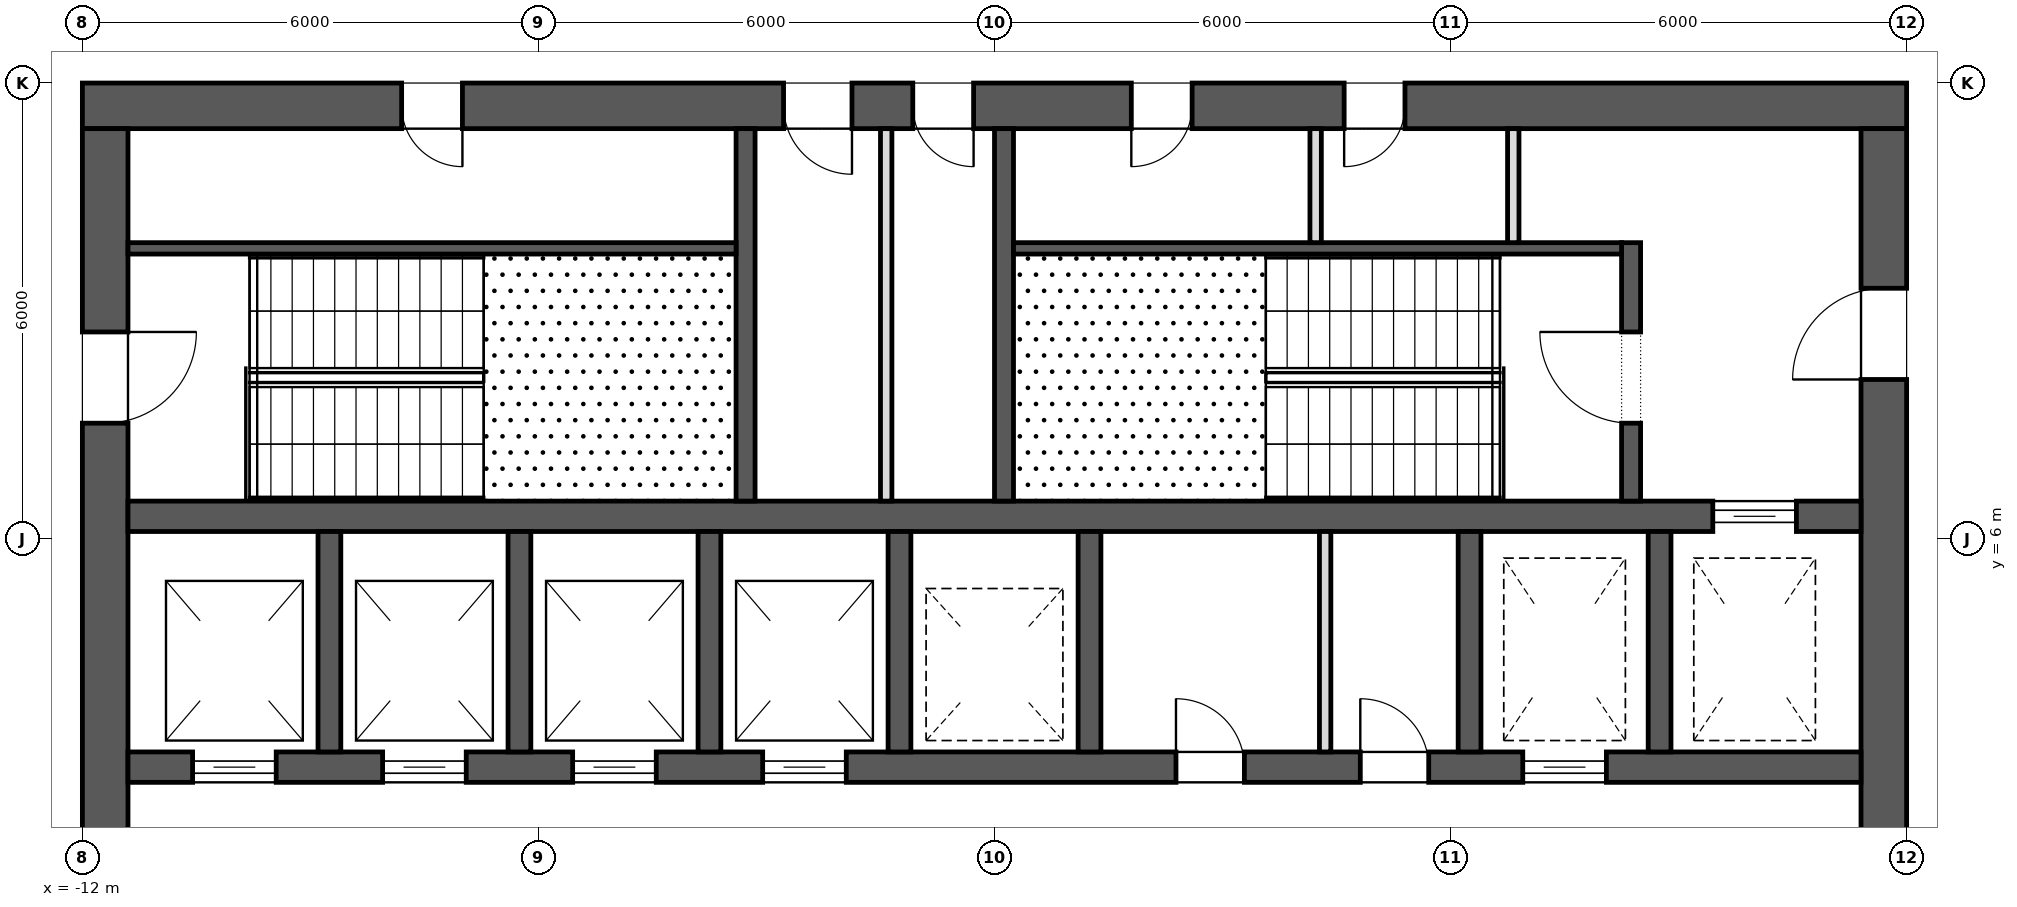
"""IFC4 building model, lengths in metres.
Left out: names, types, materials, properties, quantities, classifications, styles, units other than length and angle.
Written with IfcOpenShell. Run it as: python <this file> out.ifc"""

import sys

from ifc_helpers import new_model, si_unit, direction, frame, frame_2d, origin, place, context, subcontext, project, spatial, rectangle, extrude, element, fill, save


model = new_model("IFC4")
c1 = context("Model", 3, precision=1e-05, world=origin(), true_north=direction((0.0, 1.0)))
c2 = subcontext(c1, "Body", "Model", "MODEL_VIEW")
j1 = project(units=[si_unit("LENGTHUNIT", "METRE"), si_unit("PLANEANGLEUNIT", "RADIAN")], contexts=[c1])
p1 = place(None, origin())
s1 = spatial("IfcSite", under=j1, at=p1, CompositionType="ELEMENT")
p2 = place(p1, origin())
s2 = spatial("IfcBuilding", under=s1, at=p2, CompositionType="ELEMENT")
p3 = place(p2, frame((0.0, 0.0, 186.9)))
s3 = spatial("IfcBuildingStorey", under=s2, at=p3, CompositionType="ELEMENT", Elevation=186.9)
p4 = place(p3, frame((-12.0, 11.7, 0.0), z_axis=(0.0, 0.0, 1.0), x_axis=(1.0, 0.0, 0.0)))
e1 = element("IfcWall", 1, at=p4, inside=s3, PredefinedType="SHEAR", context=c2, shape_type="SweptSolid", body=[
    extrude(rectangle(XDim=24.0, YDim=0.6, at=frame_2d((12.0, 0.0))), origin(), (0.0, 0.0, 1.0), 4.0),
])
p5 = place(p4, frame((9.225, 0.0, 0.0)))
e2 = element("IfcOpeningElement", 2, at=p5, cuts=e1, PredefinedType="OPENING", context=c2, shape_type="SweptSolid", body=[
    extrude(rectangle(XDim=0.9, YDim=2.1, at=frame_2d((0.45, 1.05))), frame((0.0, 0.312, 0.0), z_axis=(0.0, -1.0, 0.0), x_axis=(1.0, 0.0, 0.0)), (0.0, 0.0, 1.0), 0.624),
])
p6 = place(p4, frame((10.925, 0.0, 0.0)))
e3 = element("IfcOpeningElement", 3, at=p6, cuts=e1, PredefinedType="OPENING", context=c2, shape_type="SweptSolid", body=[
    extrude(rectangle(XDim=0.8, YDim=2.1, at=frame_2d((0.4, 1.05))), frame((0.0, 0.312, 0.0), z_axis=(0.0, -1.0, 0.0), x_axis=(1.0, 0.0, 0.0)), (0.0, 0.0, 1.0), 0.624),
])
p7 = place(p4, frame((4.2, 0.0, 0.0)))
e4 = element("IfcOpeningElement", 4, at=p7, cuts=e1, PredefinedType="OPENING", context=c2, shape_type="SweptSolid", body=[
    extrude(rectangle(XDim=0.8, YDim=2.1, at=frame_2d((0.4, 1.05))), frame((0.0, 0.312, 0.0), z_axis=(0.0, -1.0, 0.0), x_axis=(1.0, 0.0, 0.0)), (0.0, 0.0, 1.0), 0.624),
])
p8 = place(p4, frame((13.8, 0.0, 0.0)))
e5 = element("IfcOpeningElement", 5, at=p8, cuts=e1, PredefinedType="OPENING", context=c2, shape_type="SweptSolid", body=[
    extrude(rectangle(XDim=0.8, YDim=2.1, at=frame_2d((0.4, 1.05))), frame((0.0, 0.312, 0.0), z_axis=(0.0, -1.0, 0.0), x_axis=(1.0, 0.0, 0.0)), (0.0, 0.0, 1.0), 0.624),
])
p9 = place(p4, frame((16.6, 0.0, 0.0)))
e6 = element("IfcOpeningElement", 6, at=p9, cuts=e1, PredefinedType="OPENING", context=c2, shape_type="SweptSolid", body=[
    extrude(rectangle(XDim=0.8, YDim=2.1, at=frame_2d((0.4, 1.05))), frame((0.0, 0.312, 0.0), z_axis=(0.0, -1.0, 0.0), x_axis=(1.0, 0.0, 0.0)), (0.0, 0.0, 1.0), 0.624),
])
p10 = place(p3, frame((11.7, -11.4, 0.0), z_axis=(0.0, 0.0, 1.0), x_axis=(0.0, 1.0, 0.0)))
e7 = element("IfcWall", 7, at=p10, inside=s3, PredefinedType="SHEAR", context=c2, shape_type="SweptSolid", body=[
    extrude(rectangle(XDim=22.8, YDim=0.6, at=frame_2d((11.4, 0.0))), origin(), (0.0, 0.0, 1.0), 4.0),
])
p11 = place(p10, frame((10.2, 0.0, 0.0)))
e8 = element("IfcOpeningElement", 8, at=p11, cuts=e7, PredefinedType="OPENING", context=c2, shape_type="SweptSolid", body=[
    extrude(rectangle(XDim=2.4, YDim=2.1, at=frame_2d((1.2, 1.05))), frame((0.0, 0.312, 0.0), z_axis=(0.0, -1.0, 0.0), x_axis=(1.0, 0.0, 0.0)), (0.0, 0.0, 1.0), 0.624),
])
p12 = place(p10, frame((19.5, 0.0, 0.0)))
e9 = element("IfcOpeningElement", 9, at=p12, cuts=e7, PredefinedType="OPENING", context=c2, shape_type="SweptSolid", body=[
    extrude(rectangle(XDim=1.2, YDim=2.1, at=frame_2d((0.6, 1.05))), frame((0.0, 0.312, 0.0), z_axis=(0.0, -1.0, 0.0), x_axis=(1.0, 0.0, 0.0)), (0.0, 0.0, 1.0), 0.624),
])
p13 = place(p10, frame((2.1, 0.0, 0.0)))
e10 = element("IfcOpeningElement", 10, at=p13, cuts=e7, PredefinedType="OPENING", context=c2, shape_type="SweptSolid", body=[
    extrude(rectangle(XDim=1.2, YDim=2.1, at=frame_2d((0.6, 1.05))), frame((0.0, 0.312, 0.0), z_axis=(0.0, -1.0, 0.0), x_axis=(1.0, 0.0, 0.0)), (0.0, 0.0, 1.0), 0.624),
])
p14 = place(p3, frame((-11.7, -11.4, 0.0), z_axis=(0.0, 0.0, 1.0), x_axis=(0.0, 1.0, 0.0)))
e11 = element("IfcWall", 11, at=p14, inside=s3, PredefinedType="SHEAR", context=c2, shape_type="SweptSolid", body=[
    extrude(rectangle(XDim=22.8, YDim=0.6, at=frame_2d((11.4, 0.0))), origin(), (0.0, 0.0, 1.0), 4.0),
])
p15 = place(p14, frame((10.2, 0.0, 0.0)))
e12 = element("IfcOpeningElement", 12, at=p15, cuts=e11, PredefinedType="OPENING", context=c2, shape_type="SweptSolid", body=[
    extrude(rectangle(XDim=2.4, YDim=2.1, at=frame_2d((1.2, 1.05))), frame((0.0, 0.312, 0.0), z_axis=(0.0, -1.0, 0.0), x_axis=(1.0, 0.0, 0.0)), (0.0, 0.0, 1.0), 0.624),
])
p16 = place(p14, frame((18.925, 0.0, 0.0)))
e13 = element("IfcOpeningElement", 13, at=p16, cuts=e11, PredefinedType="OPENING", context=c2, shape_type="SweptSolid", body=[
    extrude(rectangle(XDim=1.2, YDim=2.1, at=frame_2d((0.6, 1.05))), frame((0.0, 0.312, 0.0), z_axis=(0.0, -1.0, 0.0), x_axis=(1.0, 0.0, 0.0)), (0.0, 0.0, 1.0), 0.624),
])
p17 = place(p14, frame((2.675, 0.0, 0.0)))
e14 = element("IfcOpeningElement", 14, at=p17, cuts=e11, PredefinedType="OPENING", context=c2, shape_type="SweptSolid", body=[
    extrude(rectangle(XDim=1.2, YDim=2.1, at=frame_2d((0.6, 1.05))), frame((0.0, 0.312, 0.0), z_axis=(0.0, -1.0, 0.0), x_axis=(1.0, 0.0, 0.0)), (0.0, 0.0, 1.0), 0.624),
])
p18 = place(p3, frame((-11.4, 3.0, 0.0), z_axis=(0.0, 0.0, 1.0), x_axis=(1.0, 0.0, 0.0)))
e15 = element("IfcWall", 15, at=p18, inside=s3, PredefinedType="SHEAR", context=c2, shape_type="SweptSolid", body=[
    extrude(rectangle(XDim=22.8, YDim=0.4, at=frame_2d((11.4, 0.0))), origin(), (0.0, 0.0, 1.0), 4.0),
])
p19 = place(p18, frame((0.85, 0.0, 0.0)))
e16 = element("IfcOpeningElement", 16, at=p19, cuts=e15, PredefinedType="OPENING", context=c2, shape_type="SweptSolid", body=[
    extrude(rectangle(XDim=1.1, YDim=2.1, at=frame_2d((0.55, 1.05))), frame((0.0, 0.212, 0.0), z_axis=(0.0, -1.0, 0.0), x_axis=(1.0, 0.0, 0.0)), (0.0, 0.0, 1.0), 0.424),
])
p20 = place(p18, frame((3.35, 0.0, 0.0)))
e17 = element("IfcOpeningElement", 17, at=p20, cuts=e15, PredefinedType="OPENING", context=c2, shape_type="SweptSolid", body=[
    extrude(rectangle(XDim=1.1, YDim=2.1, at=frame_2d((0.55, 1.05))), frame((0.0, 0.212, 0.0), z_axis=(0.0, -1.0, 0.0), x_axis=(1.0, 0.0, 0.0)), (0.0, 0.0, 1.0), 0.424),
])
p21 = place(p18, frame((5.85, 0.0, 0.0)))
e18 = element("IfcOpeningElement", 18, at=p21, cuts=e15, PredefinedType="OPENING", context=c2, shape_type="SweptSolid", body=[
    extrude(rectangle(XDim=1.1, YDim=2.1, at=frame_2d((0.55, 1.05))), frame((0.0, 0.212, 0.0), z_axis=(0.0, -1.0, 0.0), x_axis=(1.0, 0.0, 0.0)), (0.0, 0.0, 1.0), 0.424),
])
p22 = place(p18, frame((8.35, 0.0, 0.0)))
e19 = element("IfcOpeningElement", 19, at=p22, cuts=e15, PredefinedType="OPENING", context=c2, shape_type="SweptSolid", body=[
    extrude(rectangle(XDim=1.1, YDim=2.1, at=frame_2d((0.55, 1.05))), frame((0.0, 0.212, 0.0), z_axis=(0.0, -1.0, 0.0), x_axis=(1.0, 0.0, 0.0)), (0.0, 0.0, 1.0), 0.424),
])
p23 = place(p18, frame((18.35, 0.0, 0.0)))
e20 = element("IfcOpeningElement", 20, at=p23, cuts=e15, PredefinedType="OPENING", context=c2, shape_type="SweptSolid", body=[
    extrude(rectangle(XDim=1.1, YDim=2.1, at=frame_2d((0.55, 1.05))), frame((0.0, 0.212, 0.0), z_axis=(0.0, -1.0, 0.0), x_axis=(1.0, 0.0, 0.0)), (0.0, 0.0, 1.0), 0.424),
])
p24 = place(p18, frame((13.788, 0.0, 0.0)))
e21 = element("IfcOpeningElement", 21, at=p24, cuts=e15, PredefinedType="OPENING", context=c2, shape_type="SweptSolid", body=[
    extrude(rectangle(XDim=0.9, YDim=2.1, at=frame_2d((0.45, 1.05))), frame((0.0, 0.212, 0.0), z_axis=(0.0, -1.0, 0.0), x_axis=(1.0, 0.0, 0.0)), (0.0, 0.0, 1.0), 0.424),
])
p25 = place(p18, frame((16.212, 0.0, 0.0)))
e22 = element("IfcOpeningElement", 22, at=p25, cuts=e15, PredefinedType="OPENING", context=c2, shape_type="SweptSolid", body=[
    extrude(rectangle(XDim=0.9, YDim=2.1, at=frame_2d((0.45, 1.05))), frame((0.0, 0.212, 0.0), z_axis=(0.0, -1.0, 0.0), x_axis=(1.0, 0.0, 0.0)), (0.0, 0.0, 1.0), 0.424),
])
p26 = place(p3, frame((-11.4, 6.3, 0.0), z_axis=(0.0, 0.0, 1.0), x_axis=(1.0, 0.0, 0.0)))
e23 = element("IfcWall", 23, at=p26, inside=s3, PredefinedType="SHEAR", context=c2, shape_type="SweptSolid", body=[
    extrude(rectangle(XDim=22.8, YDim=0.4, at=frame_2d((11.4, 0.0))), origin(), (0.0, 0.0, 1.0), 4.0),
])
p27 = place(p26, frame((20.85, 0.0, 0.0)))
e24 = element("IfcOpeningElement", 24, at=p27, cuts=e23, PredefinedType="OPENING", context=c2, shape_type="SweptSolid", body=[
    extrude(rectangle(XDim=1.1, YDim=2.1, at=frame_2d((0.55, 1.05))), frame((0.0, 0.212, 0.0), z_axis=(0.0, -1.0, 0.0), x_axis=(1.0, 0.0, 0.0)), (0.0, 0.0, 1.0), 0.424),
])
for number, where, z_axis, x_axis in (
    (25, (-8.75, 3.2, 0.0), (0.0, 0.0, 1.0), (0.0, 1.0, 0.0)),
    (26, (-6.25, 3.2, 0.0), (0.0, 0.0, 1.0), (0.0, 1.0, 0.0)),
    (27, (-3.75, 3.2, 0.0), (0.0, 0.0, 1.0), (0.0, 1.0, 0.0)),
    (28, (-1.25, 3.2, 0.0), (0.0, 0.0, 1.0), (0.0, 1.0, 0.0)),
    (29, (1.25, 3.2, 0.0), (0.0, 0.0, 1.0), (0.0, 1.0, 0.0)),
    (30, (6.25, 3.2, 0.0), (0.0, 0.0, 1.0), (0.0, 1.0, 0.0)),
    (31, (8.75, 3.2, 0.0), (0.0, 0.0, 1.0), (0.0, 1.0, 0.0)),
):
    element("IfcWall", number, at=place(p3, frame(where, z_axis=z_axis, x_axis=x_axis)), inside=s3, PredefinedType="SHEAR", context=c2, shape_type="SweptSolid", body=[
        extrude(rectangle(XDim=2.9, YDim=0.3, at=frame_2d((1.45, 0.0))), origin(), (0.0, 0.0, 1.0), 4.0),
    ])
for number, where, z_axis, x_axis in (
    (32, (-3.275, 6.5, 0.0), (0.0, 0.0, 1.0), (0.0, 1.0, 0.0)),
    (33, (0.125, 6.5, 0.0), (0.0, 0.0, 1.0), (0.0, 1.0, 0.0)),
):
    element("IfcWall", number, at=place(p3, frame(where, z_axis=z_axis, x_axis=x_axis)), inside=s3, PredefinedType="SHEAR", context=c2, shape_type="SweptSolid", body=[
        extrude(rectangle(XDim=4.9, YDim=0.25, at=frame_2d((2.45, 0.0))), origin(), (0.0, 0.0, 1.0), 3.7),
    ])
p28 = place(p3, frame((8.375, 6.5, 0.0), z_axis=(0.0, 0.0, 1.0), x_axis=(0.0, 1.0, 0.0)))
e34 = element("IfcWall", 34, at=p28, inside=s3, PredefinedType="SHEAR", context=c2, shape_type="SweptSolid", body=[
    extrude(rectangle(XDim=3.4, YDim=0.25, at=frame_2d((1.7, 0.0))), origin(), (0.0, 0.0, 1.0), 3.7),
])
p29 = place(p28, frame((1.025, 0.0, 0.0)))
e35 = element("IfcOpeningElement", 35, at=p29, cuts=e34, PredefinedType="OPENING", context=c2, shape_type="SweptSolid", body=[
    extrude(rectangle(XDim=1.2, YDim=2.1, at=frame_2d((0.6, 1.05))), frame((0.0, 0.137, 0.0), z_axis=(0.0, -1.0, 0.0), x_axis=(1.0, 0.0, 0.0)), (0.0, 0.0, 1.0), 0.274),
])
for number, where, z_axis, x_axis in (
    (36, (-11.4, 9.825, 0.0), (0.0, 0.0, 1.0), (1.0, 0.0, 0.0)),
    (37, (0.25, 9.825, 0.0), (0.0, 0.0, 1.0), (1.0, 0.0, 0.0)),
):
    element("IfcWall", number, at=place(p3, frame(where, z_axis=z_axis, x_axis=x_axis)), inside=s3, PredefinedType="SHEAR", context=c2, shape_type="SweptSolid", body=[
        extrude(rectangle(XDim=8.0, YDim=0.15, at=frame_2d((4.0, 0.0))), origin(), (0.0, 0.0, 1.0), 3.7),
    ])
p30 = place(p3, frame((-1.425, 6.5, 0.0), z_axis=(0.0, 0.0, 1.0), x_axis=(0.0, 1.0, 0.0)))
e38 = element("IfcWall", 38, at=p30, inside=s3, PredefinedType="PARTITIONING", context=c2, shape_type="SweptSolid", body=[
    extrude(rectangle(XDim=4.9, YDim=0.15, at=frame_2d((2.45, 0.0))), origin(), (0.0, 0.0, 1.0), 3.7),
])
for number, where, z_axis, x_axis in (
    (39, (4.225, 9.9, 0.0), (0.0, 0.0, 1.0), (0.0, 1.0, 0.0)),
    (40, (6.825, 9.9, 0.0), (0.0, 0.0, 1.0), (0.0, 1.0, 0.0)),
):
    element("IfcWall", number, at=place(p3, frame(where, z_axis=z_axis, x_axis=x_axis)), inside=s3, PredefinedType="PARTITIONING", context=c2, shape_type="SweptSolid", body=[
        extrude(rectangle(XDim=1.5, YDim=0.15, at=frame_2d((0.75, 0.0))), origin(), (0.0, 0.0, 1.0), 3.7),
    ])
p31 = place(p3, frame((4.35, 3.2, 0.0), z_axis=(0.0, 0.0, 1.0), x_axis=(0.0, 1.0, 0.0)))
e41 = element("IfcWall", 41, at=p31, inside=s3, PredefinedType="PARTITIONING", context=c2, shape_type="SweptSolid", body=[
    extrude(rectangle(XDim=2.9, YDim=0.15, at=frame_2d((1.45, 0.0))), origin(), (0.0, 0.0, 1.0), 3.7),
])
p32 = place(p27, origin())
e42 = element("IfcDoor", 42, at=p32, inside=s3, OperationType="SLIDING_TO_LEFT", PredefinedType="DOOR", context=c2, shape_type="SweptSolid", body=[
    extrude(rectangle(XDim=1.1, YDim=2.1, at=frame_2d((0.55, 1.05))), frame((0.0, 0.025, 0.0), z_axis=(0.0, -1.0, 0.0), x_axis=(1.0, 0.0, 0.0)), (0.0, 0.0, 1.0), 0.05),
])
fill(e24, e42)
p33 = place(p19, origin())
e43 = element("IfcDoor", 43, at=p33, inside=s3, OperationType="SLIDING_TO_LEFT", PredefinedType="DOOR", context=c2, shape_type="SweptSolid", body=[
    extrude(rectangle(XDim=1.1, YDim=2.1, at=frame_2d((0.55, 1.05))), frame((0.0, 0.025, 0.0), z_axis=(0.0, -1.0, 0.0), x_axis=(1.0, 0.0, 0.0)), (0.0, 0.0, 1.0), 0.05),
])
fill(e16, e43)
p34 = place(p20, origin())
e44 = element("IfcDoor", 44, at=p34, inside=s3, OperationType="SLIDING_TO_LEFT", PredefinedType="DOOR", context=c2, shape_type="SweptSolid", body=[
    extrude(rectangle(XDim=1.1, YDim=2.1, at=frame_2d((0.55, 1.05))), frame((0.0, 0.025, 0.0), z_axis=(0.0, -1.0, 0.0), x_axis=(1.0, 0.0, 0.0)), (0.0, 0.0, 1.0), 0.05),
])
fill(e17, e44)
p35 = place(p21, origin())
e45 = element("IfcDoor", 45, at=p35, inside=s3, OperationType="SLIDING_TO_LEFT", PredefinedType="DOOR", context=c2, shape_type="SweptSolid", body=[
    extrude(rectangle(XDim=1.1, YDim=2.1, at=frame_2d((0.55, 1.05))), frame((0.0, 0.025, 0.0), z_axis=(0.0, -1.0, 0.0), x_axis=(1.0, 0.0, 0.0)), (0.0, 0.0, 1.0), 0.05),
])
fill(e18, e45)
p36 = place(p22, origin())
e46 = element("IfcDoor", 46, at=p36, inside=s3, OperationType="SLIDING_TO_LEFT", PredefinedType="DOOR", context=c2, shape_type="SweptSolid", body=[
    extrude(rectangle(XDim=1.1, YDim=2.1, at=frame_2d((0.55, 1.05))), frame((0.0, 0.025, 0.0), z_axis=(0.0, -1.0, 0.0), x_axis=(1.0, 0.0, 0.0)), (0.0, 0.0, 1.0), 0.05),
])
fill(e19, e46)
p37 = place(p23, origin())
e47 = element("IfcDoor", 47, at=p37, inside=s3, OperationType="SLIDING_TO_LEFT", PredefinedType="DOOR", context=c2, shape_type="SweptSolid", body=[
    extrude(rectangle(XDim=1.1, YDim=2.1, at=frame_2d((0.55, 1.05))), frame((0.0, 0.025, 0.0), z_axis=(0.0, -1.0, 0.0), x_axis=(1.0, 0.0, 0.0)), (0.0, 0.0, 1.0), 0.05),
])
fill(e20, e47)
p38 = place(p16, frame((1.2, 0.0, 0.0), z_axis=(0.0, 0.0, 1.0), x_axis=(-1.0, 0.0, 0.0)))
e48 = element("IfcDoor", 48, at=p38, inside=s3, OperationType="SINGLE_SWING_RIGHT", PredefinedType="DOOR", context=c2, shape_type="SweptSolid", body=[
    extrude(rectangle(XDim=1.2, YDim=2.1, at=frame_2d((0.6, 1.05))), frame((0.0, 0.025, 0.0), z_axis=(0.0, -1.0, 0.0), x_axis=(1.0, 0.0, 0.0)), (0.0, 0.0, 1.0), 0.05),
])
fill(e13, e48)
p39 = place(p29, origin())
e49 = element("IfcDoor", 49, at=p39, inside=s3, OperationType="SINGLE_SWING_LEFT", PredefinedType="DOOR", context=c2, shape_type="SweptSolid", body=[
    extrude(rectangle(XDim=1.2, YDim=2.1, at=frame_2d((0.6, 1.05))), frame((0.0, 0.025, 0.0), z_axis=(0.0, -1.0, 0.0), x_axis=(1.0, 0.0, 0.0)), (0.0, 0.0, 1.0), 0.05),
])
fill(e35, e49)
p40 = place(p12, origin())
e50 = element("IfcDoor", 50, at=p40, inside=s3, OperationType="SINGLE_SWING_RIGHT", PredefinedType="DOOR", context=c2, shape_type="SweptSolid", body=[
    extrude(rectangle(XDim=1.2, YDim=2.1, at=frame_2d((0.6, 1.05))), frame((0.0, 0.025, 0.0), z_axis=(0.0, -1.0, 0.0), x_axis=(1.0, 0.0, 0.0)), (0.0, 0.0, 1.0), 0.05),
])
fill(e9, e50)
p41 = place(p5, frame((0.9, 0.0, 0.0), z_axis=(0.0, 0.0, 1.0), x_axis=(-1.0, 0.0, 0.0)))
e51 = element("IfcDoor", 51, at=p41, inside=s3, OperationType="SINGLE_SWING_RIGHT", PredefinedType="DOOR", context=c2, shape_type="SweptSolid", body=[
    extrude(rectangle(XDim=0.9, YDim=2.1, at=frame_2d((0.45, 1.05))), frame((0.0, 0.025, 0.0), z_axis=(0.0, -1.0, 0.0), x_axis=(1.0, 0.0, 0.0)), (0.0, 0.0, 1.0), 0.05),
])
fill(e2, e51)
p42 = place(p6, frame((0.8, 0.0, 0.0), z_axis=(0.0, 0.0, 1.0), x_axis=(-1.0, 0.0, 0.0)))
e52 = element("IfcDoor", 52, at=p42, inside=s3, OperationType="SINGLE_SWING_RIGHT", PredefinedType="DOOR", context=c2, shape_type="SweptSolid", body=[
    extrude(rectangle(XDim=0.8, YDim=2.1, at=frame_2d((0.4, 1.05))), frame((0.0, 0.025, 0.0), z_axis=(0.0, -1.0, 0.0), x_axis=(1.0, 0.0, 0.0)), (0.0, 0.0, 1.0), 0.05),
])
fill(e3, e52)
p43 = place(p7, frame((0.8, 0.0, 0.0), z_axis=(0.0, 0.0, 1.0), x_axis=(-1.0, 0.0, 0.0)))
e53 = element("IfcDoor", 53, at=p43, inside=s3, OperationType="SINGLE_SWING_RIGHT", PredefinedType="DOOR", context=c2, shape_type="SweptSolid", body=[
    extrude(rectangle(XDim=0.8, YDim=2.1, at=frame_2d((0.4, 1.05))), frame((0.0, 0.025, 0.0), z_axis=(0.0, -1.0, 0.0), x_axis=(1.0, 0.0, 0.0)), (0.0, 0.0, 1.0), 0.05),
])
fill(e4, e53)
p44 = place(p8, frame((0.8, 0.0, 0.0), z_axis=(0.0, 0.0, 1.0), x_axis=(-1.0, 0.0, 0.0)))
e54 = element("IfcDoor", 54, at=p44, inside=s3, OperationType="SINGLE_SWING_LEFT", PredefinedType="DOOR", context=c2, shape_type="SweptSolid", body=[
    extrude(rectangle(XDim=0.8, YDim=2.1, at=frame_2d((0.4, 1.05))), frame((0.0, 0.025, 0.0), z_axis=(0.0, -1.0, 0.0), x_axis=(1.0, 0.0, 0.0)), (0.0, 0.0, 1.0), 0.05),
])
fill(e5, e54)
p45 = place(p9, frame((0.8, 0.0, 0.0), z_axis=(0.0, 0.0, 1.0), x_axis=(-1.0, 0.0, 0.0)))
e55 = element("IfcDoor", 55, at=p45, inside=s3, OperationType="SINGLE_SWING_LEFT", PredefinedType="DOOR", context=c2, shape_type="SweptSolid", body=[
    extrude(rectangle(XDim=0.8, YDim=2.1, at=frame_2d((0.4, 1.05))), frame((0.0, 0.025, 0.0), z_axis=(0.0, -1.0, 0.0), x_axis=(1.0, 0.0, 0.0)), (0.0, 0.0, 1.0), 0.05),
])
fill(e6, e55)
p46 = place(p24, origin())
e56 = element("IfcDoor", 56, at=p46, inside=s3, OperationType="SINGLE_SWING_RIGHT", PredefinedType="DOOR", context=c2, shape_type="SweptSolid", body=[
    extrude(rectangle(XDim=0.9, YDim=2.1, at=frame_2d((0.45, 1.05))), frame((0.0, 0.025, 0.0), z_axis=(0.0, -1.0, 0.0), x_axis=(1.0, 0.0, 0.0)), (0.0, 0.0, 1.0), 0.05),
])
fill(e21, e56)
p47 = place(p25, origin())
e57 = element("IfcDoor", 57, at=p47, inside=s3, OperationType="SINGLE_SWING_RIGHT", PredefinedType="DOOR", context=c2, shape_type="SweptSolid", body=[
    extrude(rectangle(XDim=0.9, YDim=2.1, at=frame_2d((0.45, 1.05))), frame((0.0, 0.025, 0.0), z_axis=(0.0, -1.0, 0.0), x_axis=(1.0, 0.0, 0.0)), (0.0, 0.0, 1.0), 0.05),
])
fill(e22, e57)
save(model, sys.argv[1])
